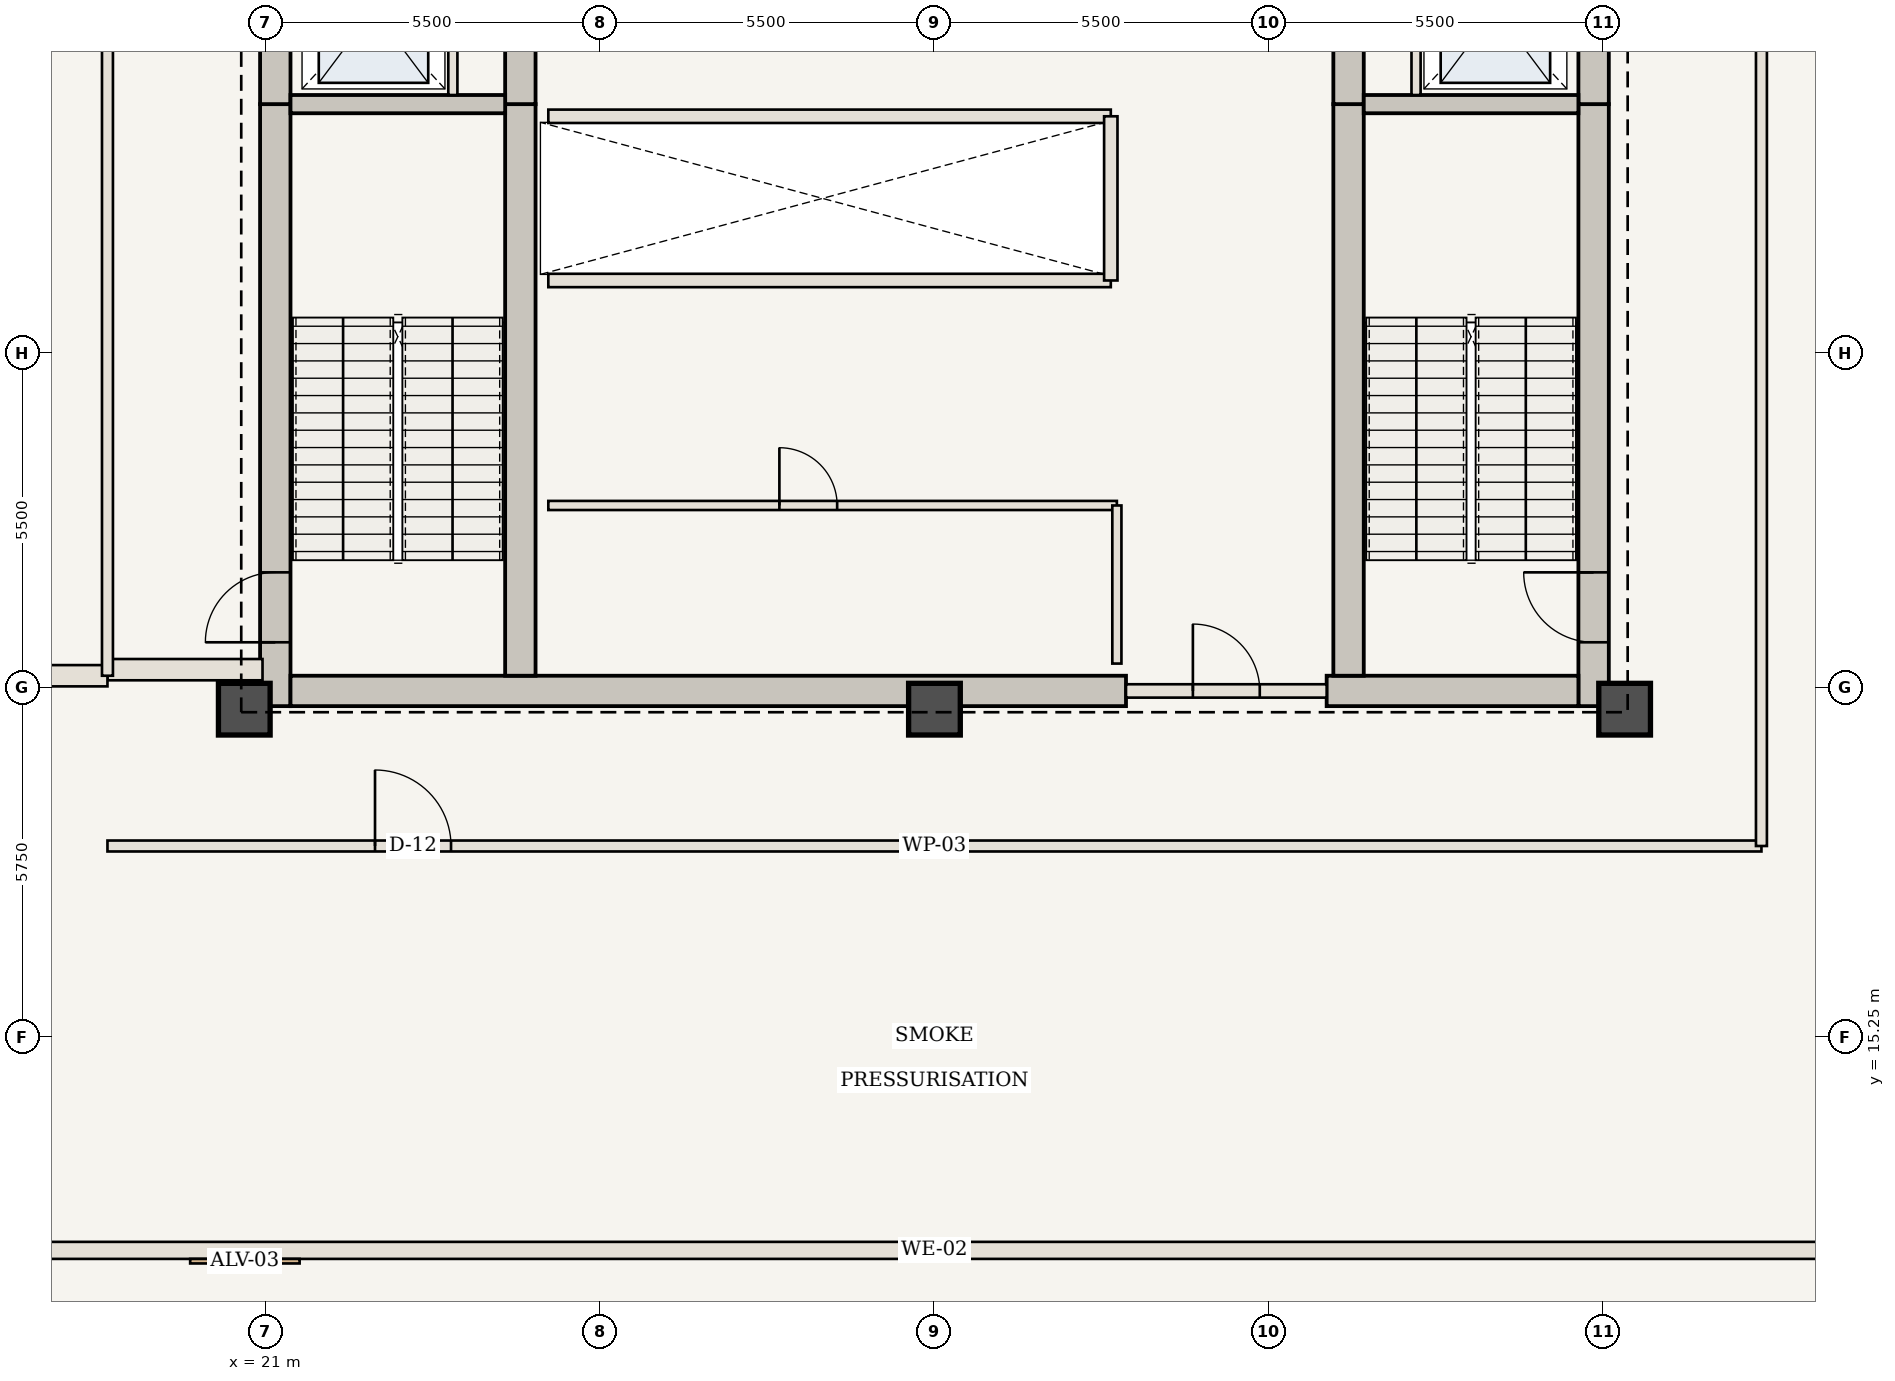
"""IFC4 building model, lengths in metres.
Left out: names, types, materials, properties, quantities, classifications, styles, units other than length and angle.
Written with IfcOpenShell. Run it as: python <this file> out.ifc"""

import sys

from ifc_helpers import new_model, si_unit, direction, frame, frame_2d, origin, origin_2d, place, context, subcontext, project, spatial, rectangle, extrude, element, fill, save


model = new_model("IFC4")
c1 = context("Model", 3, precision=1e-05, world=origin(), true_north=direction((0.0, 1.0)))
c2 = subcontext(c1, "Body", "Model", "MODEL_VIEW")
j1 = project(units=[si_unit("LENGTHUNIT", "METRE"), si_unit("PLANEANGLEUNIT", "RADIAN")], contexts=[c1])
p1 = place(None, origin())
s1 = spatial("IfcSite", under=j1, at=p1, CompositionType="ELEMENT")
p2 = place(p1, origin())
s2 = spatial("IfcBuilding", under=s1, at=p2, CompositionType="ELEMENT")
p3 = place(p2, frame((0.0, 0.0, 252.35)))
s3 = spatial("IfcBuildingStorey", under=s2, at=p3, CompositionType="ELEMENT", Elevation=252.35)
p4 = place(p3, frame((21.16, 20.7, 0.0), z_axis=(0.0, 0.0, 1.0), x_axis=(0.0, 1.0, 0.0)))
e1 = element("IfcWall", 1, at=p4, inside=s3, PredefinedType="SHEAR", context=c2, shape_type="SweptSolid", body=[
    extrude(rectangle(XDim=9.9, YDim=0.5, at=frame_2d((4.95, 0.0))), origin(), (0.0, 0.0, 1.0), 5.25),
])
p5 = place(p4, frame((1.05, 0.0, 0.0)))
e2 = element("IfcOpeningElement", 2, at=p5, cuts=e1, PredefinedType="OPENING", context=c2, shape_type="SweptSolid", body=[
    extrude(rectangle(XDim=1.15, YDim=2.15, at=frame_2d((0.575, 1.075))), frame((0.0, 0.26, 0.0), z_axis=(0.0, -1.0, 0.0), x_axis=(1.0, 0.0, 0.0)), (0.0, 0.0, 1.0), 0.52),
])
p6 = place(p3, frame((21.16, 30.6, 0.0), z_axis=(0.0, 0.0, 1.0), x_axis=(0.0, 1.0, 0.0)))
e3 = element("IfcWall", 3, at=p6, inside=s3, PredefinedType="SHEAR", context=c2, shape_type="SweptSolid", body=[
    extrude(rectangle(XDim=12.65, YDim=0.5, at=frame_2d((6.325, 0.0))), origin(), (0.0, 0.0, 1.0), 5.25),
])
p7 = place(p6, frame((4.2, 0.0, 0.0)))
e4 = element("IfcOpeningElement", 4, at=p7, cuts=e3, PredefinedType="OPENING", context=c2, shape_type="SweptSolid", body=[
    extrude(rectangle(XDim=1.1, YDim=2.15, at=frame_2d((0.55, 1.075))), frame((0.0, 0.26, 0.0), z_axis=(0.0, -1.0, 0.0), x_axis=(1.0, 0.0, 0.0)), (0.0, 0.0, 1.0), 0.52),
])
p8 = place(p6, frame((9.2, 0.0, 0.0)))
e5 = element("IfcOpeningElement", 5, at=p8, cuts=e3, PredefinedType="OPENING", context=c2, shape_type="SweptSolid", body=[
    extrude(rectangle(XDim=0.92, YDim=2.1, at=frame_2d((0.46, 1.05))), frame((0.0, 0.26, 0.0), z_axis=(0.0, -1.0, 0.0), x_axis=(1.0, 0.0, 0.0)), (0.0, 0.0, 1.0), 0.52),
])
p9 = place(p3, frame((42.84, 20.7, 0.0), z_axis=(0.0, 0.0, 1.0), x_axis=(0.0, 1.0, 0.0)))
e6 = element("IfcWall", 6, at=p9, inside=s3, PredefinedType="SHEAR", context=c2, shape_type="SweptSolid", body=[
    extrude(rectangle(XDim=9.9, YDim=0.5, at=frame_2d((4.95, 0.0))), origin(), (0.0, 0.0, 1.0), 5.25),
])
p10 = place(p9, frame((1.05, 0.0, 0.0)))
e7 = element("IfcOpeningElement", 7, at=p10, cuts=e6, PredefinedType="OPENING", context=c2, shape_type="SweptSolid", body=[
    extrude(rectangle(XDim=1.15, YDim=2.15, at=frame_2d((0.575, 1.075))), frame((0.0, 0.26, 0.0), z_axis=(0.0, -1.0, 0.0), x_axis=(1.0, 0.0, 0.0)), (0.0, 0.0, 1.0), 0.52),
])
p11 = place(p3, frame((42.84, 30.6, 0.0), z_axis=(0.0, 0.0, 1.0), x_axis=(0.0, 1.0, 0.0)))
e8 = element("IfcWall", 8, at=p11, inside=s3, PredefinedType="SHEAR", context=c2, shape_type="SweptSolid", body=[
    extrude(rectangle(XDim=12.65, YDim=0.5, at=frame_2d((6.325, 0.0))), origin(), (0.0, 0.0, 1.0), 5.25),
])
p12 = place(p11, frame((4.2, 0.0, 0.0)))
e9 = element("IfcOpeningElement", 9, at=p12, cuts=e8, PredefinedType="OPENING", context=c2, shape_type="SweptSolid", body=[
    extrude(rectangle(XDim=1.1, YDim=2.15, at=frame_2d((0.55, 1.075))), frame((0.0, 0.26, 0.0), z_axis=(0.0, -1.0, 0.0), x_axis=(1.0, 0.0, 0.0)), (0.0, 0.0, 1.0), 0.52),
])
p13 = place(p11, frame((8.05, 0.0, 0.0)))
e10 = element("IfcOpeningElement", 10, at=p13, cuts=e8, PredefinedType="OPENING", context=c2, shape_type="SweptSolid", body=[
    extrude(rectangle(XDim=0.88, YDim=2.1, at=frame_2d((0.44, 1.05))), frame((0.0, 0.26, 0.0), z_axis=(0.0, -1.0, 0.0), x_axis=(1.0, 0.0, 0.0)), (0.0, 0.0, 1.0), 0.52),
])
p14 = place(p11, frame((9.45, 0.0, 0.0)))
e11 = element("IfcOpeningElement", 11, at=p14, cuts=e8, PredefinedType="OPENING", context=c2, shape_type="SweptSolid", body=[
    extrude(rectangle(XDim=0.88, YDim=2.1, at=frame_2d((0.44, 1.05))), frame((0.0, 0.26, 0.0), z_axis=(0.0, -1.0, 0.0), x_axis=(1.0, 0.0, 0.0)), (0.0, 0.0, 1.0), 0.52),
])
p15 = place(p11, frame((10.85, 0.0, 0.0)))
e12 = element("IfcOpeningElement", 12, at=p15, cuts=e8, PredefinedType="OPENING", context=c2, shape_type="SweptSolid", body=[
    extrude(rectangle(XDim=0.88, YDim=2.1, at=frame_2d((0.44, 1.05))), frame((0.0, 0.26, 0.0), z_axis=(0.0, -1.0, 0.0), x_axis=(1.0, 0.0, 0.0)), (0.0, 0.0, 1.0), 0.52),
])
p16 = place(p3, frame((21.41, 20.95, 0.0), z_axis=(0.0, 0.0, 1.0), x_axis=(1.0, 0.0, 0.0)))
e13 = element("IfcWall", 13, at=p16, inside=s3, PredefinedType="SHEAR", context=c2, shape_type="SweptSolid", body=[
    extrude(rectangle(XDim=13.74, YDim=0.5, at=frame_2d((6.87, 0.0))), origin(), (0.0, 0.0, 1.0), 5.25),
])
p17 = place(p3, frame((38.45, 20.95, 0.0), z_axis=(0.0, 0.0, 1.0), x_axis=(1.0, 0.0, 0.0)))
e14 = element("IfcWall", 14, at=p17, inside=s3, PredefinedType="SHEAR", context=c2, shape_type="SweptSolid", body=[
    extrude(rectangle(XDim=4.14, YDim=0.5, at=frame_2d((2.07, 0.0))), origin(), (0.0, 0.0, 1.0), 5.25),
])
p18 = place(p3, frame((25.19, 21.2, 0.0), z_axis=(0.0, 0.0, 1.0), x_axis=(0.0, 1.0, 0.0)))
e15 = element("IfcWall", 15, at=p18, inside=s3, PredefinedType="SHEAR", context=c2, shape_type="SweptSolid", body=[
    extrude(rectangle(XDim=9.4, YDim=0.5, at=frame_2d((4.7, 0.0))), origin(), (0.0, 0.0, 1.0), 5.25),
])
p19 = place(p3, frame((25.19, 30.6, 0.0), z_axis=(0.0, 0.0, 1.0), x_axis=(0.0, 1.0, 0.0)))
e16 = element("IfcWall", 16, at=p19, inside=s3, PredefinedType="SHEAR", context=c2, shape_type="SweptSolid", body=[
    extrude(rectangle(XDim=12.15, YDim=0.5, at=frame_2d((6.075, 0.0))), origin(), (0.0, 0.0, 1.0), 5.25),
])
p20 = place(p19, frame((6.25, 0.0, 0.0)))
e17 = element("IfcOpeningElement", 17, at=p20, cuts=e16, PredefinedType="OPENING", context=c2, shape_type="SweptSolid", body=[
    extrude(rectangle(XDim=1.1, YDim=2.15, at=frame_2d((0.55, 1.075))), frame((0.0, 0.26, 0.0), z_axis=(0.0, -1.0, 0.0), x_axis=(1.0, 0.0, 0.0)), (0.0, 0.0, 1.0), 0.52),
])
p21 = place(p3, frame((38.81, 21.2, 0.0), z_axis=(0.0, 0.0, 1.0), x_axis=(0.0, 1.0, 0.0)))
e18 = element("IfcWall", 18, at=p21, inside=s3, PredefinedType="SHEAR", context=c2, shape_type="SweptSolid", body=[
    extrude(rectangle(XDim=9.4, YDim=0.5, at=frame_2d((4.7, 0.0))), origin(), (0.0, 0.0, 1.0), 5.25),
])
p22 = place(p3, frame((38.81, 30.6, 0.0), z_axis=(0.0, 0.0, 1.0), x_axis=(0.0, 1.0, 0.0)))
e19 = element("IfcWall", 19, at=p22, inside=s3, PredefinedType="SHEAR", context=c2, shape_type="SweptSolid", body=[
    extrude(rectangle(XDim=12.15, YDim=0.5, at=frame_2d((6.075, 0.0))), origin(), (0.0, 0.0, 1.0), 5.25),
])
for number, where, z_axis, x_axis in (
    (20, (20.65, 20.65, 0.0), (0.0, 0.0, 1.0), (1.0, 0.0, 0.0)),
    (21, (32.0, 20.65, 0.0), (0.0, 0.0, 1.0), (1.0, 0.0, 0.0)),
    (22, (43.35, 20.65, 0.0), (0.0, 0.0, 1.0), (1.0, 0.0, 0.0)),
):
    element("IfcColumn", number, at=place(p3, frame(where, z_axis=z_axis, x_axis=x_axis)), inside=s3, PredefinedType="COLUMN", context=c2, shape_type="SweptSolid", body=[
        extrude(rectangle(XDim=0.85, YDim=0.85, at=origin_2d()), origin(), (0.0, 0.0, 1.0), 4.83),
    ])
for number, where, z_axis, x_axis in (
    (23, (21.41, 30.6, 0.0), (0.0, 0.0, 1.0), (1.0, 0.0, 0.0)),
    (24, (39.06, 30.6, 0.0), (0.0, 0.0, 1.0), (1.0, 0.0, 0.0)),
):
    element("IfcWall", number, at=place(p3, frame(where, z_axis=z_axis, x_axis=x_axis)), inside=s3, PredefinedType="SHEAR", context=c2, shape_type="SweptSolid", body=[
        extrude(rectangle(XDim=3.53, YDim=0.3, at=frame_2d((1.765, 0.0))), origin(), (0.0, 0.0, 1.0), 4.83),
    ])
for number, where, z_axis, x_axis in (
    (25, (24.08, 30.75, 0.0), (0.0, 0.0, 1.0), (0.0, 1.0, 0.0)),
    (26, (39.92, 30.75, 0.0), (0.0, 0.0, 1.0), (0.0, 1.0, 0.0)),
):
    element("IfcWall", number, at=place(p3, frame(where, z_axis=z_axis, x_axis=x_axis)), inside=s3, PredefinedType="STANDARD", context=c2, shape_type="SweptSolid", body=[
        extrude(rectangle(XDim=2.65, YDim=0.15, at=frame_2d((1.325, 0.0))), origin(), (0.0, 0.0, 1.0), 4.83),
    ])
p23 = place(p3, frame((35.15, 20.95, 0.0), z_axis=(0.0, 0.0, 1.0), x_axis=(1.0, 0.0, 0.0)))
e27 = element("IfcWall", 27, at=p23, inside=s3, PredefinedType="STANDARD", context=c2, shape_type="SweptSolid", body=[
    extrude(rectangle(XDim=3.3, YDim=0.22, at=frame_2d((1.65, 0.0))), origin(), (0.0, 0.0, 1.0), 4.83),
])
p24 = place(p23, frame((1.1, 0.0, 0.0)))
e28 = element("IfcOpeningElement", 28, at=p24, cuts=e27, PredefinedType="OPENING", context=c2, shape_type="SweptSolid", body=[
    extrude(rectangle(XDim=1.1, YDim=2.15, at=frame_2d((0.55, 1.075))), frame((0.0, 0.12, 0.0), z_axis=(0.0, -1.0, 0.0), x_axis=(1.0, 0.0, 0.0)), (0.0, 0.0, 1.0), 0.24),
])
p25 = place(p3, frame((25.65, 24.0, 0.0), z_axis=(0.0, 0.0, 1.0), x_axis=(1.0, 0.0, 0.0)))
e29 = element("IfcWall", 29, at=p25, inside=s3, PredefinedType="STANDARD", context=c2, shape_type="SweptSolid", body=[
    extrude(rectangle(XDim=9.35, YDim=0.15, at=frame_2d((4.675, 0.0))), origin(), (0.0, 0.0, 1.0), 4.83),
])
p26 = place(p25, frame((3.8, 0.0, 0.0)))
e30 = element("IfcOpeningElement", 30, at=p26, cuts=e29, PredefinedType="OPENING", context=c2, shape_type="SweptSolid", body=[
    extrude(rectangle(XDim=0.95, YDim=2.15, at=frame_2d((0.475, 1.075))), frame((0.0, 0.085, 0.0), z_axis=(0.0, -1.0, 0.0), x_axis=(1.0, 0.0, 0.0)), (0.0, 0.0, 1.0), 0.17),
])
p27 = place(p3, frame((35.0, 21.4, 0.0), z_axis=(0.0, 0.0, 1.0), x_axis=(0.0, 1.0, 0.0)))
e31 = element("IfcWall", 31, at=p27, inside=s3, PredefinedType="STANDARD", context=c2, shape_type="SweptSolid", body=[
    extrude(rectangle(XDim=2.6, YDim=0.15, at=frame_2d((1.3, 0.0))), origin(), (0.0, 0.0, 1.0), 4.83),
])
for number, where, z_axis, x_axis in (
    (32, (25.65, 27.7, 0.0), (0.0, 0.0, 1.0), (1.0, 0.0, 0.0)),
    (33, (25.65, 30.4, 0.0), (0.0, 0.0, 1.0), (1.0, 0.0, 0.0)),
):
    element("IfcWall", number, at=place(p3, frame(where, z_axis=z_axis, x_axis=x_axis)), inside=s3, PredefinedType="STANDARD", context=c2, shape_type="SweptSolid", body=[
        extrude(rectangle(XDim=9.25, YDim=0.22, at=frame_2d((4.625, 0.0))), origin(), (0.0, 0.0, 1.0), 4.83),
    ])
p28 = place(p3, frame((34.9, 27.7, 0.0), z_axis=(0.0, 0.0, 1.0), x_axis=(0.0, 1.0, 0.0)))
e34 = element("IfcWall", 34, at=p28, inside=s3, PredefinedType="STANDARD", context=c2, shape_type="SweptSolid", body=[
    extrude(rectangle(XDim=2.7, YDim=0.22, at=frame_2d((1.35, 0.0))), origin(), (0.0, 0.0, 1.0), 4.83),
])
p29 = place(p3, frame((18.4, 21.3, 0.0), z_axis=(0.0, 0.0, 1.0), x_axis=(1.0, 0.0, 0.0)))
e35 = element("IfcWall", 35, at=p29, inside=s3, PredefinedType="STANDARD", context=c2, shape_type="SweptSolid", body=[
    extrude(rectangle(XDim=2.55, YDim=0.35, at=frame_2d((1.275, 0.0))), origin(), (0.0, 0.0, 1.0), 2.858),
])
p30 = place(p3, frame((18.4, 18.4, 0.0), z_axis=(0.0, 0.0, 1.0), x_axis=(1.0, 0.0, 0.0)))
e36 = element("IfcWall", 36, at=p30, inside=s3, PredefinedType="STANDARD", context=c2, shape_type="SweptSolid", body=[
    extrude(rectangle(XDim=27.2, YDim=0.18, at=frame_2d((13.6, 0.0))), origin(), (0.0, 0.0, 1.0), 4.83),
])
p31 = place(p30, frame((4.4, 0.0, 0.0)))
e37 = element("IfcOpeningElement", 37, at=p31, cuts=e36, PredefinedType="OPENING", context=c2, shape_type="SweptSolid", body=[
    extrude(rectangle(XDim=1.25, YDim=2.2, at=frame_2d((0.625, 1.1))), frame((0.0, 0.1, 0.0), z_axis=(0.0, -1.0, 0.0), x_axis=(1.0, 0.0, 0.0)), (0.0, 0.0, 1.0), 0.2),
])
p32 = place(p3, frame((11.8, 21.2, 0.0), z_axis=(0.0, 0.0, 1.0), x_axis=(1.0, 0.0, 0.0)))
e38 = element("IfcWall", 38, at=p32, inside=s3, PredefinedType="STANDARD", context=c2, shape_type="SweptSolid", body=[
    extrude(rectangle(XDim=6.6, YDim=0.35, at=frame_2d((3.3, 0.0))), origin(), (0.0, 0.0, 1.0), 2.858),
])
p33 = place(p3, frame((18.4, 21.2, 0.0), z_axis=(0.0, 0.0, 1.0), x_axis=(0.0, 1.0, 0.0)))
e39 = element("IfcWall", 39, at=p33, inside=s3, PredefinedType="STANDARD", context=c2, shape_type="SweptSolid", body=[
    extrude(rectangle(XDim=21.6, YDim=0.18, at=frame_2d((10.8, 0.0))), origin(), (0.0, 0.0, 1.0), 4.83),
])
p34 = place(p33, frame((11.75, 0.0, 0.0)))
e40 = element("IfcOpeningElement", 40, at=p34, cuts=e39, PredefinedType="OPENING", context=c2, shape_type="SweptSolid", body=[
    extrude(rectangle(XDim=1.1, YDim=2.15, at=frame_2d((0.55, 1.075))), frame((0.0, 0.1, 0.0), z_axis=(0.0, -1.0, 0.0), x_axis=(1.0, 0.0, 0.0)), (0.0, 0.0, 1.0), 0.2),
])
p35 = place(p3, frame((45.6, 18.4, 0.0), z_axis=(0.0, 0.0, 1.0), x_axis=(0.0, 1.0, 0.0)))
e41 = element("IfcWall", 41, at=p35, inside=s3, PredefinedType="STANDARD", context=c2, shape_type="SweptSolid", body=[
    extrude(rectangle(XDim=27.2, YDim=0.18, at=frame_2d((13.6, 0.0))), origin(), (0.0, 0.0, 1.0), 4.83),
])
p36 = place(p35, frame((14.55, 0.0, 0.0)))
e42 = element("IfcOpeningElement", 42, at=p36, cuts=e41, PredefinedType="OPENING", context=c2, shape_type="SweptSolid", body=[
    extrude(rectangle(XDim=1.25, YDim=2.2, at=frame_2d((0.625, 1.1))), frame((0.0, 0.1, 0.0), z_axis=(0.0, -1.0, 0.0), x_axis=(1.0, 0.0, 0.0)), (0.0, 0.0, 1.0), 0.2),
])
p37 = place(p3, frame((52.25, 11.75, 0.0), z_axis=(0.0, 0.0, 1.0), x_axis=(-1.0, 0.0, 0.0)))
e43 = element("IfcWall", 43, at=p37, inside=s3, PredefinedType="USERDEFINED", context=c2, shape_type="SweptSolid", body=[
    extrude(rectangle(XDim=40.5, YDim=0.28, at=frame_2d((20.25, 0.0))), origin(), (0.0, 0.0, 1.0), 2.83),
])
p38 = place(p5, origin())
e44 = element("IfcDoor", 44, at=p38, inside=s3, OperationType="SINGLE_SWING_LEFT", PredefinedType="DOOR", context=c2, shape_type="SweptSolid", body=[
    extrude(rectangle(XDim=1.15, YDim=2.15, at=frame_2d((0.575, 1.075))), frame((0.0, 0.025, 0.0), z_axis=(0.0, -1.0, 0.0), x_axis=(1.0, 0.0, 0.0)), (0.0, 0.0, 1.0), 0.05),
])
fill(e2, e44)
p39 = place(p10, origin())
e45 = element("IfcDoor", 45, at=p39, inside=s3, OperationType="SINGLE_SWING_RIGHT", PredefinedType="DOOR", context=c2, shape_type="SweptSolid", body=[
    extrude(rectangle(XDim=1.15, YDim=2.15, at=frame_2d((0.575, 1.075))), frame((0.0, 0.025, 0.0), z_axis=(0.0, -1.0, 0.0), x_axis=(1.0, 0.0, 0.0)), (0.0, 0.0, 1.0), 0.05),
])
fill(e7, e45)
p40 = place(p24, origin())
e46 = element("IfcDoor", 46, at=p40, inside=s3, OperationType="SINGLE_SWING_LEFT", PredefinedType="DOOR", context=c2, shape_type="SweptSolid", body=[
    extrude(rectangle(XDim=1.1, YDim=2.15, at=frame_2d((0.55, 1.075))), frame((0.0, 0.025, 0.0), z_axis=(0.0, -1.0, 0.0), x_axis=(1.0, 0.0, 0.0)), (0.0, 0.0, 1.0), 0.05),
])
fill(e28, e46)
p41 = place(p26, origin())
e47 = element("IfcDoor", 47, at=p41, inside=s3, OperationType="SINGLE_SWING_LEFT", PredefinedType="DOOR", context=c2, shape_type="SweptSolid", body=[
    extrude(rectangle(XDim=0.95, YDim=2.15, at=frame_2d((0.475, 1.075))), frame((0.0, 0.025, 0.0), z_axis=(0.0, -1.0, 0.0), x_axis=(1.0, 0.0, 0.0)), (0.0, 0.0, 1.0), 0.05),
])
fill(e30, e47)
p42 = place(p31, origin())
e48 = element("IfcDoor", 48, at=p42, inside=s3, OperationType="SINGLE_SWING_LEFT", PredefinedType="DOOR", context=c2, shape_type="SweptSolid", body=[
    extrude(rectangle(XDim=1.25, YDim=2.2, at=frame_2d((0.625, 1.1))), frame((0.0, 0.025, 0.0), z_axis=(0.0, -1.0, 0.0), x_axis=(1.0, 0.0, 0.0)), (0.0, 0.0, 1.0), 0.05),
])
fill(e37, e48)
save(model, sys.argv[1])
